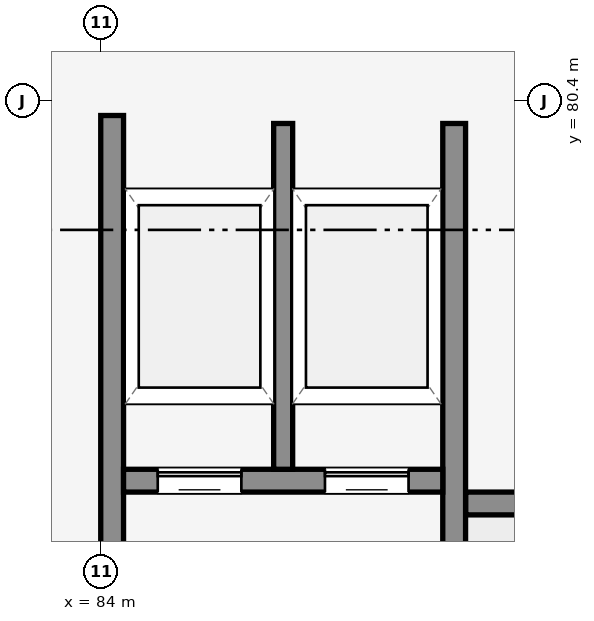
"""IFC4 building model, lengths in metres.
Left out: names, types, materials, properties, quantities, classifications, styles, units other than length and angle.
Written with IfcOpenShell. Run it as: python <this file> out.ifc"""

import sys

from ifc_helpers import new_model, si_unit, direction, frame, frame_2d, origin, origin_2d, place, context, subcontext, project, spatial, rectangle, i_section, extrude, element, fill, save


model = new_model("IFC4")
c1 = context("Model", 3, precision=1e-05, world=origin(), true_north=direction((0.0, 1.0)))
c2 = subcontext(c1, "Body", "Model", "MODEL_VIEW")
j1 = project(units=[si_unit("LENGTHUNIT", "METRE"), si_unit("PLANEANGLEUNIT", "RADIAN")], contexts=[c1])
p1 = place(None, origin())
s1 = spatial("IfcSite", under=j1, at=p1, CompositionType="ELEMENT")
p2 = place(p1, origin())
s2 = spatial("IfcBuilding", under=s1, at=p2, CompositionType="ELEMENT")
p3 = place(p2, frame((0.0, 0.0, -5.4)))
s3 = spatial("IfcBuildingStorey", under=s2, at=p3, CompositionType="ELEMENT", Elevation=-5.4)
p4 = place(p3, frame((84.0, 80.4, 0.0), z_axis=(0.0, 0.0, 1.0), x_axis=(1.0, 0.0, 0.0)))
e1 = element("IfcColumn", 1, at=p4, inside=s3, PredefinedType="COLUMN", context=c2, shape_type="SweptSolid", body=[
    extrude(i_section(OverallWidth=0.399, OverallDepth=0.394, WebThickness=0.023, FlangeThickness=0.037, FilletRadius=0.015, at=origin_2d()), origin(), (0.0, 0.0, 1.0), 5.4),
])
p5 = place(p3, frame((84.198, 80.25, 0.0), z_axis=(0.0, 0.0, 1.0), x_axis=(1.0, 0.0, 0.0)))
e2 = element("IfcWall", 2, at=p5, inside=s3, PredefinedType="SHEAR", context=c2, shape_type="SweptSolid", body=[
    extrude(rectangle(XDim=8.005, YDim=0.3, at=frame_2d((4.002, 0.0))), origin(), (0.0, 0.0, 1.0), 5.12),
])
p6 = place(p3, frame((88.8, 75.1, 0.0), z_axis=(0.0, 0.0, 1.0), x_axis=(1.0, 0.0, 0.0)))
e3 = element("IfcWall", 3, at=p6, inside=s3, PredefinedType="SHEAR", context=c2, shape_type="SweptSolid", body=[
    extrude(rectangle(XDim=3.3, YDim=0.3, at=frame_2d((1.65, 0.0))), origin(), (0.0, 0.0, 1.0), 5.12),
])
p7 = place(p3, frame((84.15, 63.795, 0.0), z_axis=(0.0, 0.0, 1.0), x_axis=(0.0, 1.0, 0.0)))
e4 = element("IfcWall", 4, at=p7, inside=s3, PredefinedType="SHEAR", context=c2, shape_type="SweptSolid", body=[
    extrude(rectangle(XDim=16.41, YDim=0.3, at=frame_2d((8.205, 0.0))), origin(), (0.0, 0.0, 1.0), 5.12),
])
p8 = place(p7, frame((5.655, 0.0, 0.0)))
e5 = element("IfcOpeningElement", 5, at=p8, cuts=e4, PredefinedType="OPENING", context=c2, shape_type="SweptSolid", body=[
    extrude(rectangle(XDim=1.3, YDim=2.2, at=frame_2d((0.65, 1.1))), frame((0.0, 0.16, 0.0), z_axis=(0.0, -1.0, 0.0), x_axis=(1.0, 0.0, 0.0)), (0.0, 0.0, 1.0), 0.32),
])
p9 = place(p3, frame((88.65, 63.9, 0.0), z_axis=(0.0, 0.0, 1.0), x_axis=(0.0, 1.0, 0.0)))
e6 = element("IfcWall", 6, at=p9, inside=s3, PredefinedType="SHEAR", context=c2, shape_type="SweptSolid", body=[
    extrude(rectangle(XDim=16.2, YDim=0.3, at=frame_2d((8.1, 0.0))), origin(), (0.0, 0.0, 1.0), 5.12),
])
p10 = place(p9, frame((0.5, 0.0, 0.0)))
e7 = element("IfcOpeningElement", 7, at=p10, cuts=e6, PredefinedType="OPENING", context=c2, shape_type="SweptSolid", body=[
    extrude(rectangle(XDim=1.15, YDim=2.15, at=frame_2d((0.575, 1.075))), frame((0.0, 0.16, 0.0), z_axis=(0.0, -1.0, 0.0), x_axis=(1.0, 0.0, 0.0)), (0.0, 0.0, 1.0), 0.32),
])
p11 = place(p3, frame((84.3, 75.4, 0.0), z_axis=(0.0, 0.0, 1.0), x_axis=(1.0, 0.0, 0.0)))
e8 = element("IfcWall", 8, at=p11, inside=s3, PredefinedType="SHEAR", context=c2, shape_type="SweptSolid", body=[
    extrude(rectangle(XDim=4.2, YDim=0.3, at=frame_2d((2.1, 0.0))), origin(), (0.0, 0.0, 1.0), 5.12),
])
p12 = place(p11, frame((0.45, 0.0, 0.0)))
e9 = element("IfcOpeningElement", 9, at=p12, cuts=e8, PredefinedType="OPENING", context=c2, shape_type="SweptSolid", body=[
    extrude(rectangle(XDim=1.1, YDim=2.2, at=frame_2d((0.55, 1.1))), frame((0.0, 0.16, 0.0), z_axis=(0.0, -1.0, 0.0), x_axis=(1.0, 0.0, 0.0)), (0.0, 0.0, 1.0), 0.32),
])
p13 = place(p11, frame((2.65, 0.0, 0.0)))
e10 = element("IfcOpeningElement", 10, at=p13, cuts=e8, PredefinedType="OPENING", context=c2, shape_type="SweptSolid", body=[
    extrude(rectangle(XDim=1.1, YDim=2.2, at=frame_2d((0.55, 1.1))), frame((0.0, 0.16, 0.0), z_axis=(0.0, -1.0, 0.0), x_axis=(1.0, 0.0, 0.0)), (0.0, 0.0, 1.0), 0.32),
])
p14 = place(p3, frame((86.4, 75.55, 0.0), z_axis=(0.0, 0.0, 1.0), x_axis=(0.0, 1.0, 0.0)))
e11 = element("IfcWall", 11, at=p14, inside=s3, PredefinedType="PARTITIONING", context=c2, shape_type="SweptSolid", body=[
    extrude(rectangle(XDim=4.55, YDim=0.25, at=frame_2d((2.275, 0.0))), origin(), (0.0, 0.0, 1.0), 4.025),
])
p15 = place(p12, origin())
e12 = element("IfcDoor", 12, at=p15, inside=s3, OperationType="SLIDING_TO_LEFT", PredefinedType="DOOR", context=c2, shape_type="SweptSolid", body=[
    extrude(rectangle(XDim=1.1, YDim=2.2, at=frame_2d((0.55, 1.1))), frame((0.0, 0.025, 0.0), z_axis=(0.0, -1.0, 0.0), x_axis=(1.0, 0.0, 0.0)), (0.0, 0.0, 1.0), 0.05),
])
fill(e9, e12)
p16 = place(p13, origin())
e13 = element("IfcDoor", 13, at=p16, inside=s3, OperationType="SLIDING_TO_LEFT", PredefinedType="DOOR", context=c2, shape_type="SweptSolid", body=[
    extrude(rectangle(XDim=1.1, YDim=2.2, at=frame_2d((0.55, 1.1))), frame((0.0, 0.025, 0.0), z_axis=(0.0, -1.0, 0.0), x_axis=(1.0, 0.0, 0.0)), (0.0, 0.0, 1.0), 0.05),
])
fill(e10, e13)
save(model, sys.argv[1])
